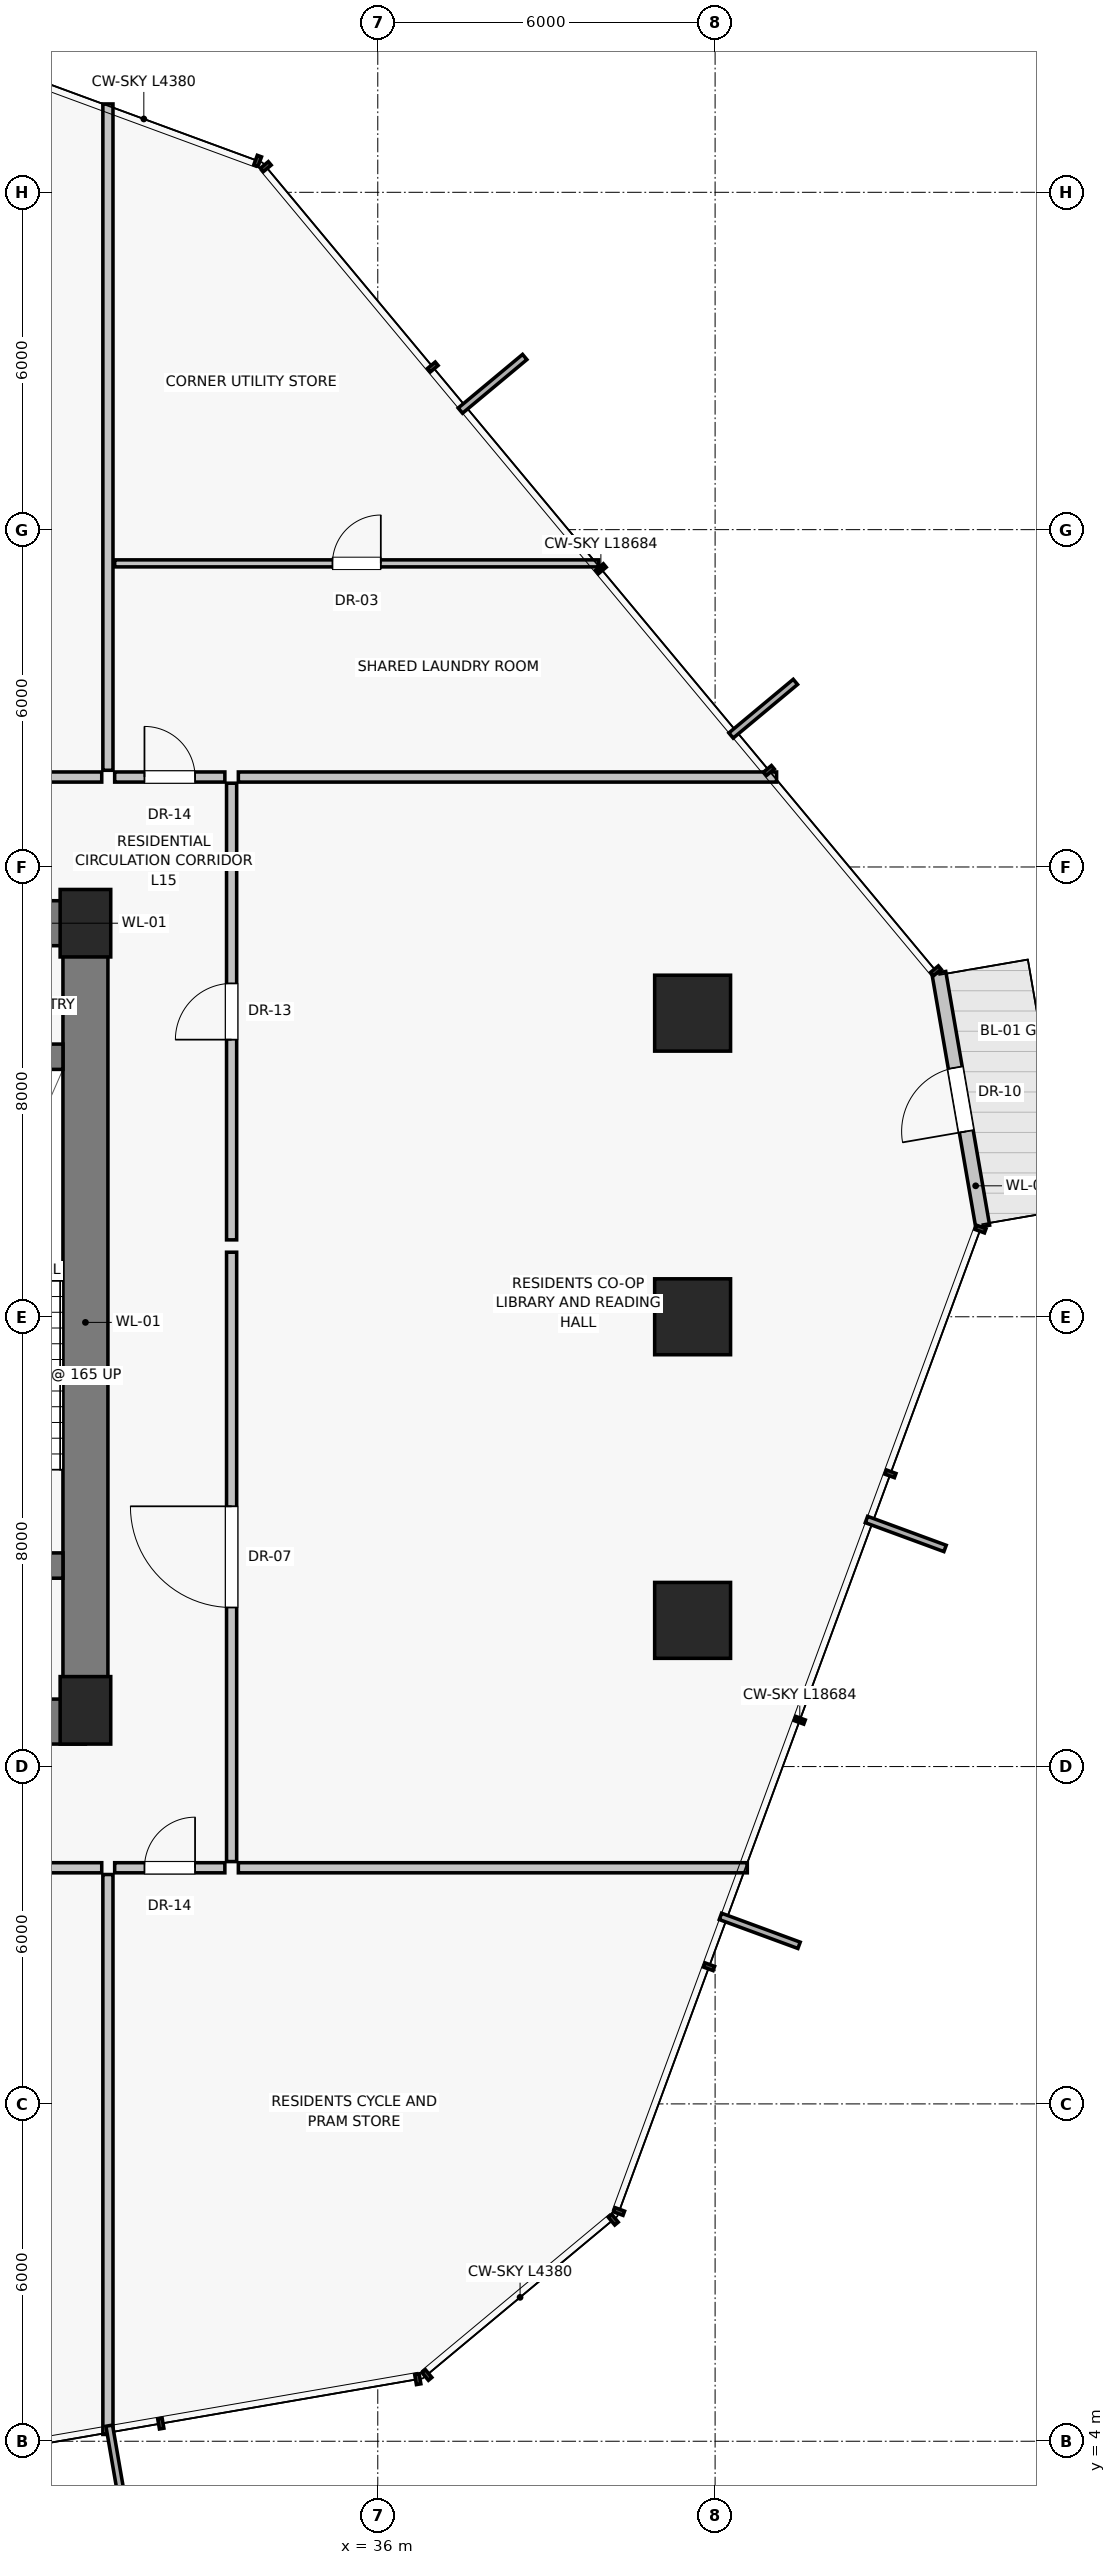
"""IFC4 building model, lengths in metres.
Left out: names, types, materials, properties, quantities, classifications, styles, units other than length and angle.
Written with IfcOpenShell. Run it as: python <this file> out.ifc"""

import sys

from ifc_helpers import new_model, si_unit, direction, frame, frame_2d, origin, origin_2d, place, context, subcontext, project, spatial, rectangle, extrude, source, transform, mapped, element, fill, save


model = new_model("IFC4")
c1 = context("Model", 3, precision=1e-05, world=origin(), true_north=direction((0.0, 1.0)))
c2 = subcontext(c1, "Body", "Model", "MODEL_VIEW")
j1 = project(units=[si_unit("LENGTHUNIT", "METRE"), si_unit("PLANEANGLEUNIT", "RADIAN")], contexts=[c1])
p1 = place(None, origin())
s1 = spatial("IfcSite", under=j1, at=p1, CompositionType="ELEMENT")
p2 = place(p1, origin())
s2 = spatial("IfcBuilding", under=s1, at=p2, CompositionType="ELEMENT")
p3 = place(p2, frame((0.0, 0.0, 56.55)))
s3 = spatial("IfcBuildingStorey", under=s2, at=p3, CompositionType="ELEMENT", Elevation=56.55)
for number, where, z_axis, x_axis in (
    (1, (30.8, 17.0, 0.0), (0.0, 0.0, 1.0), (1.0, 0.0, 0.0)),
    (2, (30.8, 31.0, 0.0), (0.0, 0.0, 1.0), (1.0, 0.0, 0.0)),
):
    element("IfcColumn", number, at=place(p3, frame(where, z_axis=z_axis, x_axis=x_axis)), inside=s3, PredefinedType="PILASTER", context=c2, shape_type="SweptSolid", body=[
        extrude(rectangle(XDim=0.9, YDim=1.2, at=origin_2d()), origin(), (0.0, 0.0, 1.0), 4.3),
    ])
for number, where, z_axis, x_axis in (
    (3, (41.6, 18.6, 0.0), (0.0, 0.0, 1.0), (1.0, 0.0, 0.0)),
    (4, (41.6, 24.0, 0.0), (0.0, 0.0, 1.0), (1.0, 0.0, 0.0)),
    (5, (41.6, 29.4, 0.0), (0.0, 0.0, 1.0), (1.0, 0.0, 0.0)),
):
    element("IfcColumn", number, at=place(p3, frame(where, z_axis=z_axis, x_axis=x_axis)), inside=s3, PredefinedType="COLUMN", context=c2, shape_type="SweptSolid", body=[
        extrude(rectangle(XDim=1.35, YDim=1.35, at=origin_2d()), origin(), (0.0, 0.0, 1.0), 4.3),
    ])
p4 = place(p3, frame((46.76, 25.607, 0.0), z_axis=(0.0, 0.0, 1.0), x_axis=(-0.170205014247, 0.985408673153, 0.0)))
e6 = element("IfcWall", 6, at=p4, inside=s3, PredefinedType="SOLIDWALL", context=c2, shape_type="SweptSolid", body=[
    extrude(rectangle(XDim=4.58, YDim=0.25, at=frame_2d((2.29, 0.0))), origin(), (0.0, 0.0, 1.0), 4.05),
])
p5 = place(p4, frame((1.715, 0.0, 0.0)))
e7 = element("IfcOpeningElement", 7, at=p5, cuts=e6, PredefinedType="OPENING", context=c2, shape_type="SweptSolid", body=[
    extrude(rectangle(XDim=1.15, YDim=2.25, at=frame_2d((0.575, 1.125))), frame((0.0, 0.135, 0.0), z_axis=(0.0, -1.0, 0.0), x_axis=(1.0, 0.0, 0.0)), (0.0, 0.0, 1.0), 0.27),
])
p6 = place(p3, frame((30.8, 16.8, 0.0), z_axis=(0.0, 0.0, 1.0), x_axis=(0.0, 1.0, 0.0)))
e8 = element("IfcWall", 8, at=p6, inside=s3, PredefinedType="SHEAR", context=c2, shape_type="SweptSolid", body=[
    extrude(rectangle(XDim=14.2, YDim=0.8, at=frame_2d((7.1, 0.0))), origin(), (0.0, 0.0, 1.0), 4.05),
])
p7 = place(p3, frame((24.95, 16.8, 0.0), z_axis=(0.0, 0.0, 1.0), x_axis=(1.0, 0.0, 0.0)))
e9 = element("IfcWall", 9, at=p7, inside=s3, PredefinedType="SHEAR", context=c2, shape_type="SweptSolid", body=[
    extrude(rectangle(XDim=5.85, YDim=0.8, at=frame_2d((2.925, 0.0))), origin(), (0.0, 0.0, 1.0), 4.05),
])
p8 = place(p7, frame((2.15, 0.0, 0.0)))
e10 = element("IfcOpeningElement", 10, at=p8, cuts=e9, PredefinedType="OPENING", context=c2, shape_type="SweptSolid", body=[
    extrude(rectangle(XDim=1.2, YDim=2.03, at=frame_2d((0.6, 1.015))), frame((0.0, 0.41, 0.0), z_axis=(0.0, -1.0, 0.0), x_axis=(1.0, 0.0, 0.0)), (0.0, 0.0, 1.0), 0.82),
])
p9 = place(p3, frame((27.0, 31.0, 0.0), z_axis=(0.0, 0.0, 1.0), x_axis=(1.0, 0.0, 0.0)))
e11 = element("IfcWall", 11, at=p9, inside=s3, PredefinedType="SHEAR", context=c2, shape_type="SweptSolid", body=[
    extrude(rectangle(XDim=3.8, YDim=0.8, at=frame_2d((1.9, 0.0))), origin(), (0.0, 0.0, 1.0), 4.05),
])
p10 = place(p9, frame((1.15, 0.0, 0.0)))
e12 = element("IfcOpeningElement", 12, at=p10, cuts=e11, PredefinedType="OPENING", context=c2, shape_type="SweptSolid", body=[
    extrude(rectangle(XDim=1.0, YDim=2.01, at=frame_2d((0.5, 1.005))), frame((0.0, 0.41, 0.0), z_axis=(0.0, -1.0, 0.0), x_axis=(1.0, 0.0, 0.0)), (0.0, 0.0, 1.0), 0.82),
])
p11 = place(p3, frame((26.975, 19.575, 0.0), z_axis=(0.0, 0.0, 1.0), x_axis=(1.0, 0.0, 0.0)))
e13 = element("IfcWall", 13, at=p11, inside=s3, PredefinedType="SHEAR", context=c2, shape_type="SweptSolid", body=[
    extrude(rectangle(XDim=3.425, YDim=0.45, at=frame_2d((1.712, 0.0))), origin(), (0.0, 0.0, 1.0), 4.05),
])
p12 = place(p11, frame((1.05, 0.0, 0.0)))
e14 = element("IfcOpeningElement", 14, at=p12, cuts=e13, PredefinedType="OPENING", context=c2, shape_type="SweptSolid", body=[
    extrude(rectangle(XDim=1.1, YDim=2.03, at=frame_2d((0.55, 1.015))), frame((0.0, 0.235, 0.0), z_axis=(0.0, -1.0, 0.0), x_axis=(1.0, 0.0, 0.0)), (0.0, 0.0, 1.0), 0.47),
])
p13 = place(p3, frame((26.975, 28.625, 0.0), z_axis=(0.0, 0.0, 1.0), x_axis=(1.0, 0.0, 0.0)))
e15 = element("IfcWall", 15, at=p13, inside=s3, PredefinedType="SHEAR", context=c2, shape_type="SweptSolid", body=[
    extrude(rectangle(XDim=3.425, YDim=0.45, at=frame_2d((1.712, 0.0))), origin(), (0.0, 0.0, 1.0), 4.05),
])
p14 = place(p3, frame((31.2, 14.08, 0.0), z_axis=(0.0, 0.0, 1.0), x_axis=(0.0, -1.0, 0.0)))
e16 = element("IfcWall", 16, at=p14, inside=s3, PredefinedType="PARTITIONING", context=c2, shape_type="SweptSolid", body=[
    extrude(rectangle(XDim=9.959, YDim=0.18, at=frame_2d((4.979, 0.0))), origin(), (0.0, 0.0, 1.0), 4.05),
])
p15 = place(p3, frame((25.118, 14.2, 0.0), z_axis=(0.0, 0.0, 1.0), x_axis=(1.0, 0.0, 0.0)))
e17 = element("IfcWall", 17, at=p15, inside=s3, PredefinedType="PARTITIONING", context=c2, shape_type="SweptSolid", body=[
    extrude(rectangle(XDim=5.972, YDim=0.18, at=frame_2d((2.986, 0.0))), origin(), (0.0, 0.0, 1.0), 4.05),
])
p16 = place(p15, frame((2.486, 0.0, 0.0)))
e18 = element("IfcOpeningElement", 18, at=p16, cuts=e17, PredefinedType="OPENING", context=c2, shape_type="SweptSolid", body=[
    extrude(rectangle(XDim=1.0, YDim=2.01, at=frame_2d((0.5, 1.005))), frame((0.0, 0.1, 0.0), z_axis=(0.0, -1.0, 0.0), x_axis=(1.0, 0.0, 0.0)), (0.0, 0.0, 1.0), 0.2),
])
p17 = place(p3, frame((31.2, 33.72, 0.0), z_axis=(0.0, 0.0, 1.0), x_axis=(0.0, 1.0, 0.0)))
e19 = element("IfcWall", 19, at=p17, inside=s3, PredefinedType="PARTITIONING", context=c2, shape_type="SweptSolid", body=[
    extrude(rectangle(XDim=11.852, YDim=0.18, at=frame_2d((5.926, 0.0))), origin(), (0.0, 0.0, 1.0), 4.05),
])
p18 = place(p3, frame((24.11, 33.6, 0.0), z_axis=(0.0, 0.0, 1.0), x_axis=(1.0, 0.0, 0.0)))
e20 = element("IfcWall", 20, at=p18, inside=s3, PredefinedType="PARTITIONING", context=c2, shape_type="SweptSolid", body=[
    extrude(rectangle(XDim=6.98, YDim=0.18, at=frame_2d((3.49, 0.0))), origin(), (0.0, 0.0, 1.0), 4.05),
])
p19 = place(p18, frame((2.99, 0.0, 0.0)))
e21 = element("IfcOpeningElement", 21, at=p19, cuts=e20, PredefinedType="OPENING", context=c2, shape_type="SweptSolid", body=[
    extrude(rectangle(XDim=1.0, YDim=2.01, at=frame_2d((0.5, 1.005))), frame((0.0, 0.1, 0.0), z_axis=(0.0, -1.0, 0.0), x_axis=(1.0, 0.0, 0.0)), (0.0, 0.0, 1.0), 0.2),
])
p20 = place(p3, frame((33.52, 14.2, 0.0), z_axis=(0.0, 0.0, 1.0), x_axis=(1.0, 0.0, 0.0)))
e22 = element("IfcWall", 22, at=p20, inside=s3, PredefinedType="PARTITIONING", context=c2, shape_type="SweptSolid", body=[
    extrude(rectangle(XDim=9.053, YDim=0.18, at=frame_2d((4.526, 0.0))), origin(), (0.0, 0.0, 1.0), 4.05),
])
p21 = place(p3, frame((33.52, 33.6, 0.0), z_axis=(0.0, 0.0, 1.0), x_axis=(1.0, 0.0, 0.0)))
e23 = element("IfcWall", 23, at=p21, inside=s3, PredefinedType="PARTITIONING", context=c2, shape_type="SweptSolid", body=[
    extrude(rectangle(XDim=9.574, YDim=0.18, at=frame_2d((4.787, 0.0))), origin(), (0.0, 0.0, 1.0), 4.05),
])
p22 = place(p3, frame((33.4, 14.31, 0.0), z_axis=(0.0, 0.0, 1.0), x_axis=(0.0, 1.0, 0.0)))
e24 = element("IfcWall", 24, at=p22, inside=s3, PredefinedType="PARTITIONING", context=c2, shape_type="SweptSolid", body=[
    extrude(rectangle(XDim=10.838, YDim=0.18, at=frame_2d((5.419, 0.0))), origin(), (0.0, 0.0, 1.0), 4.05),
])
p23 = place(p22, frame((4.519, 0.0, 0.0)))
e25 = element("IfcOpeningElement", 25, at=p23, cuts=e24, PredefinedType="OPENING", context=c2, shape_type="SweptSolid", body=[
    extrude(rectangle(XDim=1.8, YDim=2.25, at=frame_2d((0.9, 1.125))), frame((0.0, 0.1, 0.0), z_axis=(0.0, -1.0, 0.0), x_axis=(1.0, 0.0, 0.0)), (0.0, 0.0, 1.0), 0.2),
])
p24 = place(p3, frame((33.4, 25.368, 0.0), z_axis=(0.0, 0.0, 1.0), x_axis=(0.0, 1.0, 0.0)))
e26 = element("IfcWall", 26, at=p24, inside=s3, PredefinedType="PARTITIONING", context=c2, shape_type="SweptSolid", body=[
    extrude(rectangle(XDim=8.122, YDim=0.18, at=frame_2d((4.061, 0.0))), origin(), (0.0, 0.0, 1.0), 4.05),
])
p25 = place(p24, frame((3.561, 0.0, 0.0)))
e27 = element("IfcOpeningElement", 27, at=p25, cuts=e26, PredefinedType="OPENING", context=c2, shape_type="SweptSolid", body=[
    extrude(rectangle(XDim=1.0, YDim=2.01, at=frame_2d((0.5, 1.005))), frame((0.0, 0.1, 0.0), z_axis=(0.0, -1.0, 0.0), x_axis=(1.0, 0.0, 0.0)), (0.0, 0.0, 1.0), 0.2),
])
p26 = place(p3, frame((31.32, 14.2, 0.0), z_axis=(0.0, 0.0, 1.0), x_axis=(1.0, 0.0, 0.0)))
e28 = element("IfcWall", 28, at=p26, inside=s3, PredefinedType="PARTITIONING", context=c2, shape_type="SweptSolid", body=[
    extrude(rectangle(XDim=1.96, YDim=0.18, at=frame_2d((0.98, 0.0))), origin(), (0.0, 0.0, 1.0), 4.05),
])
p27 = place(p26, frame((0.53, 0.0, 0.0)))
e29 = element("IfcOpeningElement", 29, at=p27, cuts=e28, PredefinedType="OPENING", context=c2, shape_type="SweptSolid", body=[
    extrude(rectangle(XDim=0.9, YDim=2.01, at=frame_2d((0.45, 1.005))), frame((0.0, 0.1, 0.0), z_axis=(0.0, -1.0, 0.0), x_axis=(1.0, 0.0, 0.0)), (0.0, 0.0, 1.0), 0.2),
])
p28 = place(p3, frame((31.32, 33.6, 0.0), z_axis=(0.0, 0.0, 1.0), x_axis=(1.0, 0.0, 0.0)))
e30 = element("IfcWall", 30, at=p28, inside=s3, PredefinedType="PARTITIONING", context=c2, shape_type="SweptSolid", body=[
    extrude(rectangle(XDim=1.96, YDim=0.18, at=frame_2d((0.98, 0.0))), origin(), (0.0, 0.0, 1.0), 4.05),
])
p29 = place(p28, frame((0.53, 0.0, 0.0)))
e31 = element("IfcOpeningElement", 31, at=p29, cuts=e30, PredefinedType="OPENING", context=c2, shape_type="SweptSolid", body=[
    extrude(rectangle(XDim=0.9, YDim=2.01, at=frame_2d((0.45, 1.005))), frame((0.0, 0.1, 0.0), z_axis=(0.0, -1.0, 0.0), x_axis=(1.0, 0.0, 0.0)), (0.0, 0.0, 1.0), 0.2),
])
p30 = place(p3, frame((31.32, 37.4, 0.0), z_axis=(0.0, 0.0, 1.0), x_axis=(1.0, 0.0, 0.0)))
e32 = element("IfcWall", 32, at=p30, inside=s3, PredefinedType="PARTITIONING", context=c2, shape_type="SweptSolid", body=[
    extrude(rectangle(XDim=8.608, YDim=0.125, at=frame_2d((4.304, 0.0))), origin(), (0.0, 0.0, 1.0), 4.05),
])
p31 = place(p30, frame((3.874, 0.0, 0.0)))
e33 = element("IfcOpeningElement", 33, at=p31, cuts=e32, PredefinedType="OPENING", context=c2, shape_type="SweptSolid", body=[
    extrude(rectangle(XDim=0.86, YDim=2.01, at=frame_2d((0.43, 1.005))), frame((0.0, 0.073, 0.0), z_axis=(0.0, -1.0, 0.0), x_axis=(1.0, 0.0, 0.0)), (0.0, 0.0, 1.0), 0.145),
])
m1 = source(origin(), c2, "Body", "SweptSolid", [
    extrude(rectangle(XDim=1.15, YDim=2.25, at=frame_2d((0.575, 1.125))), frame((0.0, 0.025, 0.0), z_axis=(0.0, -1.0, 0.0), x_axis=(1.0, 0.0, 0.0)), (0.0, 0.0, 1.0), 0.05),
])
p32 = place(p5, frame((1.15, 0.0, 0.0), z_axis=(0.0, 0.0, 1.0), x_axis=(-1.0, 0.0, 0.0)))
e34 = element("IfcDoor", 34, at=p32, inside=s3, OperationType="SINGLE_SWING_LEFT", PredefinedType="DOOR", context=c2, shape_type="MappedRepresentation", body=[
    mapped(m1, transform((0.0, 0.0, 0.0), scale=1.0)),
])
fill(e7, e34)
m2 = source(origin(), c2, "Body", "SweptSolid", [
    extrude(rectangle(XDim=1.8, YDim=2.25, at=frame_2d((0.9, 1.125))), frame((0.0, 0.025, 0.0), z_axis=(0.0, -1.0, 0.0), x_axis=(1.0, 0.0, 0.0)), (0.0, 0.0, 1.0), 0.05),
])
p33 = place(p23, origin())
e35 = element("IfcDoor", 35, at=p33, inside=s3, OperationType="SINGLE_SWING_RIGHT", PredefinedType="DOOR", context=c2, shape_type="MappedRepresentation", body=[
    mapped(m2, transform((0.0, 0.0, 0.0), scale=1.0)),
])
fill(e25, e35)
m3 = source(origin(), c2, "Body", "SweptSolid", [
    extrude(rectangle(XDim=1.0, YDim=2.01, at=frame_2d((0.5, 1.005))), frame((0.0, 0.025, 0.0), z_axis=(0.0, -1.0, 0.0), x_axis=(1.0, 0.0, 0.0)), (0.0, 0.0, 1.0), 0.05),
])
p34 = place(p25, origin())
e36 = element("IfcDoor", 36, at=p34, inside=s3, OperationType="SINGLE_SWING_LEFT", PredefinedType="DOOR", context=c2, shape_type="MappedRepresentation", body=[
    mapped(m3, transform((0.0, 0.0, 0.0), scale=1.0)),
])
fill(e27, e36)
m4 = source(origin(), c2, "Body", "SweptSolid", [
    extrude(rectangle(XDim=0.9, YDim=2.01, at=frame_2d((0.45, 1.005))), frame((0.0, 0.025, 0.0), z_axis=(0.0, -1.0, 0.0), x_axis=(1.0, 0.0, 0.0)), (0.0, 0.0, 1.0), 0.05),
])
p35 = place(p27, origin())
e37 = element("IfcDoor", 37, at=p35, inside=s3, OperationType="SINGLE_SWING_RIGHT", PredefinedType="DOOR", context=c2, shape_type="MappedRepresentation", body=[
    mapped(m4, transform((0.0, 0.0, 0.0), scale=1.0)),
])
fill(e29, e37)
p36 = place(p29, origin())
e38 = element("IfcDoor", 38, at=p36, inside=s3, OperationType="SINGLE_SWING_LEFT", PredefinedType="DOOR", context=c2, shape_type="MappedRepresentation", body=[
    mapped(m4, transform((0.0, 0.0, 0.0), scale=1.0)),
])
fill(e31, e38)
m5 = source(origin(), c2, "Body", "SweptSolid", [
    extrude(rectangle(XDim=0.86, YDim=2.01, at=frame_2d((0.43, 1.005))), frame((0.0, 0.025, 0.0), z_axis=(0.0, -1.0, 0.0), x_axis=(1.0, 0.0, 0.0)), (0.0, 0.0, 1.0), 0.05),
])
p37 = place(p31, origin())
e39 = element("IfcDoor", 39, at=p37, inside=s3, OperationType="SINGLE_SWING_RIGHT", PredefinedType="DOOR", context=c2, shape_type="MappedRepresentation", body=[
    mapped(m5, transform((0.0, 0.0, 0.0), scale=1.0)),
])
fill(e33, e39)
save(model, sys.argv[1])
